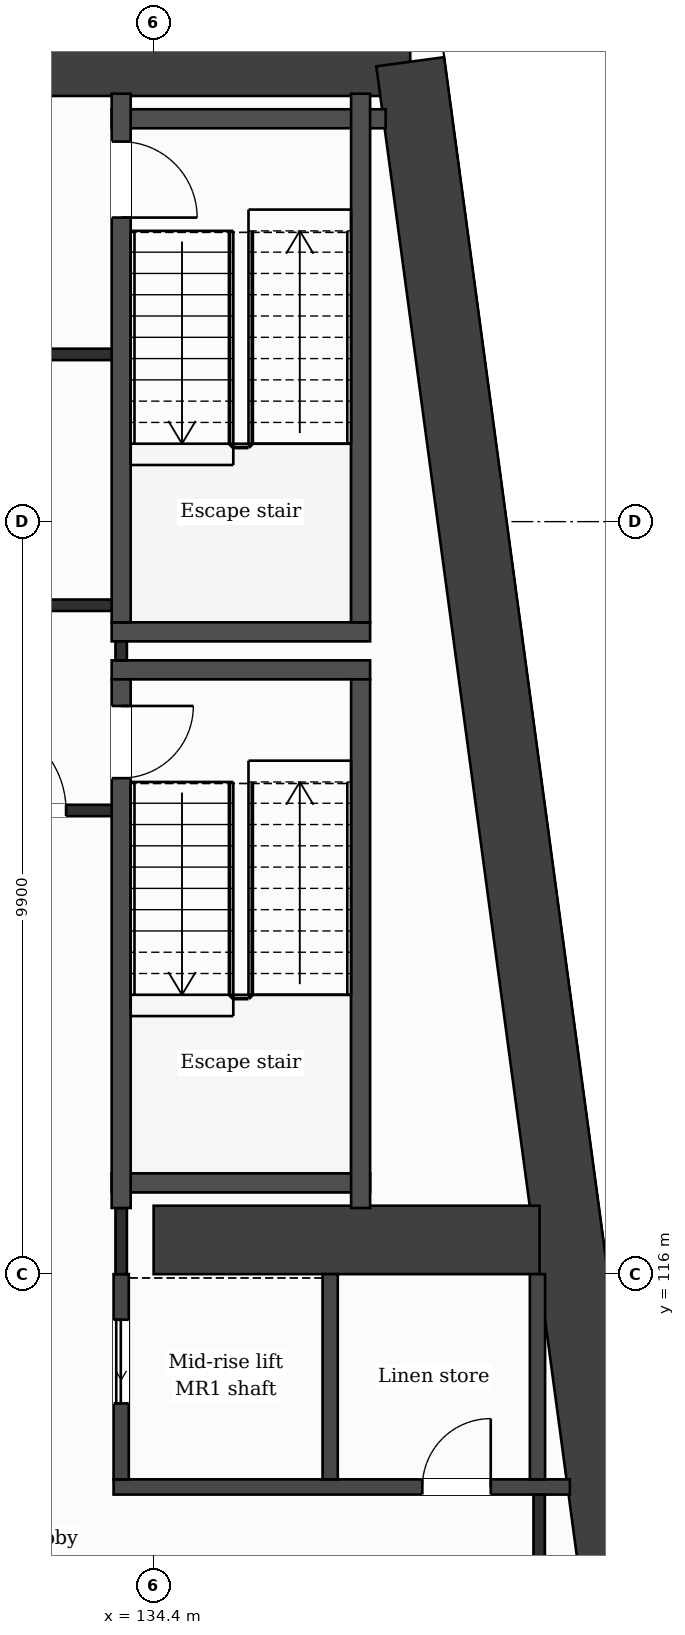
"""IFC4 building model, lengths in metres.
Left out: names, types, materials, properties, quantities, classifications, styles, units other than length and angle.
Written with IfcOpenShell. Run it as: python <this file> out.ifc"""

import sys

from ifc_helpers import new_model, si_unit, direction, frame, frame_2d, origin, place, context, subcontext, project, spatial, rectangle, extrude, element, fill, save


model = new_model("IFC4")
c1 = context("Model", 3, precision=1e-05, world=origin(), true_north=direction((0.0, 1.0)))
c2 = subcontext(c1, "Body", "Model", "MODEL_VIEW")
j1 = project(units=[si_unit("LENGTHUNIT", "METRE"), si_unit("PLANEANGLEUNIT", "RADIAN")], contexts=[c1])
p1 = place(None, origin())
s1 = spatial("IfcSite", under=j1, at=p1, CompositionType="ELEMENT")
p2 = place(p1, origin())
s2 = spatial("IfcBuilding", under=s1, at=p2, CompositionType="ELEMENT")
p3 = place(p2, frame((0.0, 0.0, 151.5)))
s3 = spatial("IfcBuildingStorey", under=s2, at=p3, CompositionType="ELEMENT", Elevation=151.5)
p4 = place(p3, frame((126.45, 131.95, 0.0), z_axis=(0.0, 0.0, 1.0), x_axis=(1.0, 0.0, 0.0)))
e1 = element("IfcWall", 1, at=p4, inside=s3, PredefinedType="SHEAR", context=c2, shape_type="SweptSolid", body=[
    extrude(rectangle(XDim=11.326, YDim=0.9, at=frame_2d((5.663, 0.0))), origin(), (0.0, 0.0, 1.0), 3.7),
])
p5 = place(p4, frame((3.386, 0.0, 0.0)))
e2 = element("IfcOpeningElement", 2, at=p5, cuts=e1, PredefinedType="OPENING", context=c2, shape_type="SweptSolid", body=[
    extrude(rectangle(XDim=1.2, YDim=2.1, at=frame_2d((0.6, 1.05))), frame((0.0, 0.46, 0.0), z_axis=(0.0, -1.0, 0.0), x_axis=(1.0, 0.0, 0.0)), (0.0, 0.0, 1.0), 0.92),
])
p6 = place(p3, frame((137.776, 131.95, 0.0), z_axis=(0.0, 0.0, 1.0), x_axis=(0.133421759112, -0.991059349482, 0.0)))
e3 = element("IfcWall", 3, at=p6, inside=s3, PredefinedType="SHEAR", context=c2, shape_type="SweptSolid", body=[
    extrude(rectangle(XDim=21.29, YDim=0.9, at=frame_2d((10.645, 0.0))), origin(), (0.0, 0.0, 1.0), 3.7),
])
p7 = place(p3, frame((134.4, 116.45, 0.0), z_axis=(0.0, 0.0, 1.0), x_axis=(1.0, 0.0, 0.0)))
e4 = element("IfcWall", 4, at=p7, inside=s3, PredefinedType="SHEAR", context=c2, shape_type="SweptSolid", body=[
    extrude(rectangle(XDim=5.077, YDim=0.9, at=frame_2d((2.539, 0.0))), origin(), (0.0, 0.0, 1.0), 3.7),
])
p8 = place(p3, frame((133.873, 113.2, 0.0), z_axis=(0.0, 0.0, 1.0), x_axis=(1.0, 0.0, 0.0)))
e5 = element("IfcWall", 5, at=p8, inside=s3, PredefinedType="PARTITIONING", context=c2, shape_type="SweptSolid", body=[
    extrude(rectangle(XDim=6.003, YDim=0.2, at=frame_2d((3.001, 0.0))), origin(), (0.0, 0.0, 1.0), 3.38),
])
p9 = place(p8, frame((4.062, 0.0, 0.0)))
e6 = element("IfcOpeningElement", 6, at=p9, cuts=e5, PredefinedType="OPENING", context=c2, shape_type="SweptSolid", body=[
    extrude(rectangle(XDim=0.9, YDim=2.1, at=frame_2d((0.45, 1.05))), frame((0.0, 0.11, 0.0), z_axis=(0.0, -1.0, 0.0), x_axis=(1.0, 0.0, 0.0)), (0.0, 0.0, 1.0), 0.22),
])
p10 = place(p3, frame((133.848, 117.2, 0.0), z_axis=(0.0, 0.0, 1.0), x_axis=(1.0, 0.0, 0.0)))
e7 = element("IfcWall", 7, at=p10, inside=s3, PredefinedType="PARTITIONING", context=c2, shape_type="SweptSolid", body=[
    extrude(rectangle(XDim=3.4, YDim=0.25, at=frame_2d((1.7, 0.0))), origin(), (0.0, 0.0, 1.0), 3.38),
])
p11 = place(p3, frame((131.573, 122.1, 0.0), z_axis=(0.0, 0.0, 1.0), x_axis=(1.0, 0.0, 0.0)))
e8 = element("IfcWall", 8, at=p11, inside=s3, PredefinedType="PARTITIONING", context=c2, shape_type="SweptSolid", body=[
    extrude(rectangle(XDim=2.4, YDim=0.15, at=frame_2d((1.2, 0.0))), origin(), (0.0, 0.0, 1.0), 3.38),
])
p12 = place(p11, frame((0.475, 0.0, 0.0)))
e9 = element("IfcOpeningElement", 9, at=p12, cuts=e8, PredefinedType="OPENING", context=c2, shape_type="SweptSolid", body=[
    extrude(rectangle(XDim=1.2, YDim=2.1, at=frame_2d((0.6, 1.05))), frame((0.0, 0.085, 0.0), z_axis=(0.0, -1.0, 0.0), x_axis=(1.0, 0.0, 0.0)), (0.0, 0.0, 1.0), 0.17),
])
for number, where, z_axis, x_axis in (
    (10, (133.848, 123.95, 0.0), (0.0, 0.0, 1.0), (1.0, 0.0, 0.0)),
    (11, (133.848, 124.45, 0.0), (0.0, 0.0, 1.0), (1.0, 0.0, 0.0)),
):
    element("IfcWall", number, at=place(p3, frame(where, z_axis=z_axis, x_axis=x_axis)), inside=s3, PredefinedType="PARTITIONING", context=c2, shape_type="SweptSolid", body=[
        extrude(rectangle(XDim=3.4, YDim=0.25, at=frame_2d((1.7, 0.0))), origin(), (0.0, 0.0, 1.0), 3.38),
    ])
p13 = place(p3, frame((131.615, 124.8, 0.0), z_axis=(0.0, 0.0, 1.0), x_axis=(1.0, 0.0, 0.0)))
e12 = element("IfcWall", 12, at=p13, inside=s3, PredefinedType="PARTITIONING", context=c2, shape_type="SweptSolid", body=[
    extrude(rectangle(XDim=2.483, YDim=0.15, at=frame_2d((1.241, 0.0))), origin(), (0.0, 0.0, 1.0), 3.38),
])
p14 = place(p3, frame((131.615, 128.1, 0.0), z_axis=(0.0, 0.0, 1.0), x_axis=(1.0, 0.0, 0.0)))
e13 = element("IfcWall", 13, at=p14, inside=s3, PredefinedType="PARTITIONING", context=c2, shape_type="SweptSolid", body=[
    extrude(rectangle(XDim=2.358, YDim=0.15, at=frame_2d((1.179, 0.0))), origin(), (0.0, 0.0, 1.0), 3.38),
])
p15 = place(p3, frame((133.848, 131.2, 0.0), z_axis=(0.0, 0.0, 1.0), x_axis=(1.0, 0.0, 0.0)))
e14 = element("IfcWall", 14, at=p15, inside=s3, PredefinedType="PARTITIONING", context=c2, shape_type="SweptSolid", body=[
    extrude(rectangle(XDim=3.605, YDim=0.25, at=frame_2d((1.802, 0.0))), origin(), (0.0, 0.0, 1.0), 3.38),
])
p16 = place(p3, frame((133.973, 113.3, 0.0), z_axis=(0.0, 0.0, 1.0), x_axis=(0.0, 1.0, 0.0)))
e15 = element("IfcWall", 15, at=p16, inside=s3, PredefinedType="PARTITIONING", context=c2, shape_type="SweptSolid", body=[
    extrude(rectangle(XDim=2.7, YDim=0.2, at=frame_2d((1.35, 0.0))), origin(), (0.0, 0.0, 1.0), 3.38),
])
p17 = place(p16, frame((1.0, 0.0, 0.0)))
e16 = element("IfcOpeningElement", 16, at=p17, cuts=e15, PredefinedType="OPENING", context=c2, shape_type="SweptSolid", body=[
    extrude(rectangle(XDim=1.1, YDim=2.1, at=frame_2d((0.55, 1.05))), frame((0.0, 0.11, 0.0), z_axis=(0.0, -1.0, 0.0), x_axis=(1.0, 0.0, 0.0)), (0.0, 0.0, 1.0), 0.22),
])
p18 = place(p3, frame((133.973, 116.0, 0.0), z_axis=(0.0, 0.0, 1.0), x_axis=(0.0, 1.0, 0.0)))
e17 = element("IfcWall", 17, at=p18, inside=s3, PredefinedType="PARTITIONING", context=c2, shape_type="SweptSolid", body=[
    extrude(rectangle(XDim=0.87, YDim=0.15, at=frame_2d((0.435, 0.0))), origin(), (0.0, 0.0, 1.0), 3.38),
])
p19 = place(p3, frame((133.973, 124.075, 0.0), z_axis=(0.0, 0.0, 1.0), x_axis=(0.0, 1.0, 0.0)))
e18 = element("IfcWall", 18, at=p19, inside=s3, PredefinedType="PARTITIONING", context=c2, shape_type="SweptSolid", body=[
    extrude(rectangle(XDim=0.25, YDim=0.15, at=frame_2d((0.125, 0.0))), origin(), (0.0, 0.0, 1.0), 3.38),
])
p20 = place(p3, frame((133.973, 116.87, 0.0), z_axis=(0.0, 0.0, 1.0), x_axis=(0.0, 1.0, 0.0)))
e19 = element("IfcWall", 19, at=p20, inside=s3, PredefinedType="PARTITIONING", context=c2, shape_type="SweptSolid", body=[
    extrude(rectangle(XDim=6.955, YDim=0.25, at=frame_2d((3.478, 0.0))), origin(), (0.0, 0.0, 1.0), 3.38),
])
p21 = place(p20, frame((5.655, 0.0, 0.0)))
e20 = element("IfcOpeningElement", 20, at=p21, cuts=e19, PredefinedType="OPENING", context=c2, shape_type="SweptSolid", body=[
    extrude(rectangle(XDim=0.95, YDim=2.1, at=frame_2d((0.475, 1.05))), frame((0.0, 0.135, 0.0), z_axis=(0.0, -1.0, 0.0), x_axis=(1.0, 0.0, 0.0)), (0.0, 0.0, 1.0), 0.27),
])
p22 = place(p3, frame((133.973, 124.575, 0.0), z_axis=(0.0, 0.0, 1.0), x_axis=(0.0, 1.0, 0.0)))
e21 = element("IfcWall", 21, at=p22, inside=s3, PredefinedType="PARTITIONING", context=c2, shape_type="SweptSolid", body=[
    extrude(rectangle(XDim=6.955, YDim=0.25, at=frame_2d((3.478, 0.0))), origin(), (0.0, 0.0, 1.0), 3.38),
])
p23 = place(p22, frame((5.325, 0.0, 0.0)))
e22 = element("IfcOpeningElement", 22, at=p23, cuts=e21, PredefinedType="OPENING", context=c2, shape_type="SweptSolid", body=[
    extrude(rectangle(XDim=1.0, YDim=2.1, at=frame_2d((0.5, 1.05))), frame((0.0, 0.135, 0.0), z_axis=(0.0, -1.0, 0.0), x_axis=(1.0, 0.0, 0.0)), (0.0, 0.0, 1.0), 0.27),
])
p24 = place(p3, frame((136.722, 113.3, 0.0), z_axis=(0.0, 0.0, 1.0), x_axis=(0.0, 1.0, 0.0)))
e23 = element("IfcWall", 23, at=p24, inside=s3, PredefinedType="PARTITIONING", context=c2, shape_type="SweptSolid", body=[
    extrude(rectangle(XDim=2.7, YDim=0.2, at=frame_2d((1.35, 0.0))), origin(), (0.0, 0.0, 1.0), 3.38),
])
p25 = place(p3, frame((137.123, 116.87, 0.0), z_axis=(0.0, 0.0, 1.0), x_axis=(0.0, 1.0, 0.0)))
e24 = element("IfcWall", 24, at=p25, inside=s3, PredefinedType="PARTITIONING", context=c2, shape_type="SweptSolid", body=[
    extrude(rectangle(XDim=6.955, YDim=0.25, at=frame_2d((3.478, 0.0))), origin(), (0.0, 0.0, 1.0), 3.38),
])
p26 = place(p3, frame((137.123, 124.575, 0.0), z_axis=(0.0, 0.0, 1.0), x_axis=(0.0, 1.0, 0.0)))
e25 = element("IfcWall", 25, at=p26, inside=s3, PredefinedType="PARTITIONING", context=c2, shape_type="SweptSolid", body=[
    extrude(rectangle(XDim=6.955, YDim=0.25, at=frame_2d((3.478, 0.0))), origin(), (0.0, 0.0, 1.0), 3.38),
])
p27 = place(p3, frame((139.45, 113.3, 0.0), z_axis=(0.0, 0.0, 1.0), x_axis=(0.0, 1.0, 0.0)))
e26 = element("IfcWall", 26, at=p27, inside=s3, PredefinedType="PARTITIONING", context=c2, shape_type="SweptSolid", body=[
    extrude(rectangle(XDim=2.7, YDim=0.2, at=frame_2d((1.35, 0.0))), origin(), (0.0, 0.0, 1.0), 3.38),
])
p28 = place(p3, frame((139.472, 111.3, 0.0), z_axis=(0.0, 0.0, 1.0), x_axis=(0.0, 1.0, 0.0)))
e27 = element("IfcWall", 27, at=p28, inside=s3, PredefinedType="PARTITIONING", context=c2, shape_type="SweptSolid", body=[
    extrude(rectangle(XDim=1.8, YDim=0.15, at=frame_2d((0.9, 0.0))), origin(), (0.0, 0.0, 1.0), 3.38),
])
p29 = place(p12, origin())
e28 = element("IfcDoor", 28, at=p29, inside=s3, OperationType="SINGLE_SWING_LEFT", PredefinedType="DOOR", context=c2, shape_type="SweptSolid", body=[
    extrude(rectangle(XDim=1.2, YDim=2.1, at=frame_2d((0.6, 1.05))), frame((0.0, 0.025, 0.0), z_axis=(0.0, -1.0, 0.0), x_axis=(1.0, 0.0, 0.0)), (0.0, 0.0, 1.0), 0.05),
])
fill(e9, e28)
p30 = place(p21, origin())
e29 = element("IfcDoor", 29, at=p30, inside=s3, OperationType="SINGLE_SWING_RIGHT", PredefinedType="DOOR", context=c2, shape_type="SweptSolid", body=[
    extrude(rectangle(XDim=0.95, YDim=2.1, at=frame_2d((0.475, 1.05))), frame((0.0, 0.025, 0.0), z_axis=(0.0, -1.0, 0.0), x_axis=(1.0, 0.0, 0.0)), (0.0, 0.0, 1.0), 0.05),
])
fill(e20, e29)
p31 = place(p23, origin())
e30 = element("IfcDoor", 30, at=p31, inside=s3, OperationType="SINGLE_SWING_LEFT", PredefinedType="DOOR", context=c2, shape_type="SweptSolid", body=[
    extrude(rectangle(XDim=1.0, YDim=2.1, at=frame_2d((0.5, 1.05))), frame((0.0, 0.025, 0.0), z_axis=(0.0, -1.0, 0.0), x_axis=(1.0, 0.0, 0.0)), (0.0, 0.0, 1.0), 0.05),
])
fill(e22, e30)
p32 = place(p17, origin())
e31 = element("IfcDoor", 31, at=p32, inside=s3, OperationType="SLIDING_TO_LEFT", PredefinedType="DOOR", context=c2, shape_type="SweptSolid", body=[
    extrude(rectangle(XDim=1.1, YDim=2.1, at=frame_2d((0.55, 1.05))), frame((0.0, 0.025, 0.0), z_axis=(0.0, -1.0, 0.0), x_axis=(1.0, 0.0, 0.0)), (0.0, 0.0, 1.0), 0.05),
])
fill(e16, e31)
p33 = place(p9, origin())
e32 = element("IfcDoor", 32, at=p33, inside=s3, OperationType="SINGLE_SWING_RIGHT", PredefinedType="DOOR", context=c2, shape_type="SweptSolid", body=[
    extrude(rectangle(XDim=0.9, YDim=2.1, at=frame_2d((0.45, 1.05))), frame((0.0, 0.025, 0.0), z_axis=(0.0, -1.0, 0.0), x_axis=(1.0, 0.0, 0.0)), (0.0, 0.0, 1.0), 0.05),
])
fill(e6, e32)
save(model, sys.argv[1])
